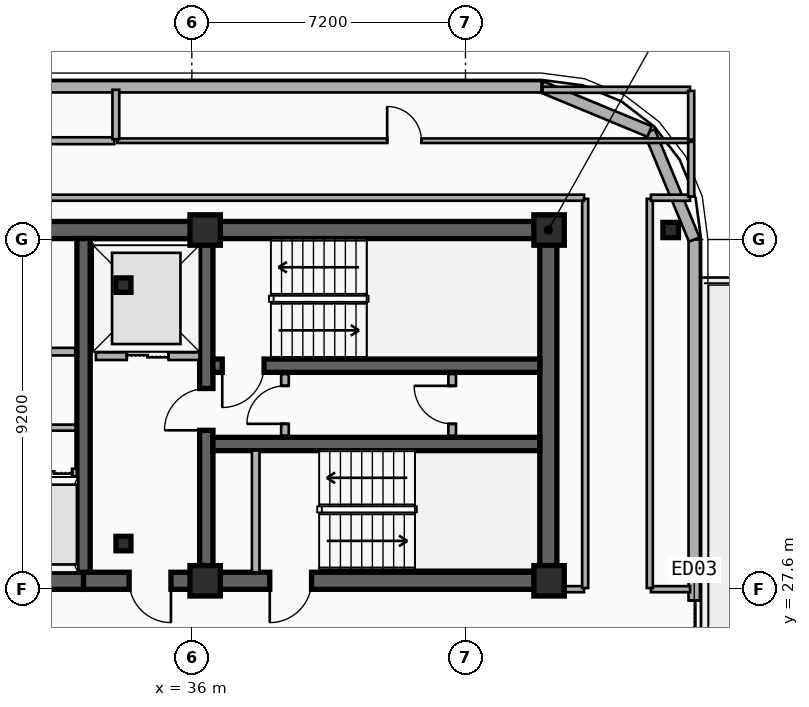
"""IFC4 building model, lengths in metres.
Left out: names, types, materials, properties, quantities, classifications, styles, units other than length and angle.
Written with IfcOpenShell. Run it as: python <this file> out.ifc"""

import sys

from ifc_helpers import new_model, si_unit, direction, frame, frame_2d, origin, origin_2d, place, context, subcontext, project, spatial, rectangle, i_section, extrude, element, fill, save


model = new_model("IFC4")
c1 = context("Model", 3, precision=1e-05, world=origin(), true_north=direction((0.0, 1.0)))
c2 = subcontext(c1, "Body", "Model", "MODEL_VIEW")
j1 = project(units=[si_unit("LENGTHUNIT", "METRE"), si_unit("PLANEANGLEUNIT", "RADIAN")], contexts=[c1])
p1 = place(None, origin())
s1 = spatial("IfcSite", under=j1, at=p1, CompositionType="ELEMENT")
p2 = place(p1, origin())
s2 = spatial("IfcBuilding", under=s1, at=p2, CompositionType="ELEMENT")
p3 = place(p2, frame((0.0, 0.0, 243.6)))
s3 = spatial("IfcBuildingStorey", under=s2, at=p3, CompositionType="ELEMENT", Elevation=243.6)
p4 = place(p3, frame((12.15, 37.05, 0.0), z_axis=(0.0, 0.0, 1.0), x_axis=(1.0, 0.0, 0.0)))
e1 = element("IfcWall", 1, at=p4, inside=s3, PredefinedType="SHEAR", context=c2, shape_type="SweptSolid", body=[
    extrude(rectangle(XDim=33.23, YDim=0.45, at=frame_2d((16.615, 0.0))), origin(), (0.0, 0.0, 1.0), 3.7),
])
p5 = place(p3, frame((33.15, 27.82, 0.0), z_axis=(0.0, 0.0, 1.0), x_axis=(-1.0, 0.0, 0.0)))
e2 = element("IfcWall", 2, at=p5, inside=s3, PredefinedType="SHEAR", context=c2, shape_type="SweptSolid", body=[
    extrude(rectangle(XDim=11.97, YDim=0.45, at=frame_2d((5.985, 0.0))), origin(), (0.0, 0.0, 1.0), 3.7),
])
p6 = place(p5, frame((6.1, 0.0, 0.0)))
e3 = element("IfcOpeningElement", 3, at=p6, cuts=e2, PredefinedType="OPENING", context=c2, shape_type="SweptSolid", body=[
    extrude(rectangle(XDim=1.6, YDim=2.2, at=frame_2d((0.8, 1.1))), frame((0.0, 0.235, 0.0), z_axis=(0.0, -1.0, 0.0), x_axis=(1.0, 0.0, 0.0)), (0.0, 0.0, 1.0), 0.47),
])
p7 = place(p3, frame((45.38, 27.82, 0.0), z_axis=(0.0, 0.0, 1.0), x_axis=(-1.0, 0.0, 0.0)))
e4 = element("IfcWall", 4, at=p7, inside=s3, PredefinedType="SHEAR", context=c2, shape_type="SweptSolid", body=[
    extrude(rectangle(XDim=12.23, YDim=0.45, at=frame_2d((6.115, 0.0))), origin(), (0.0, 0.0, 1.0), 3.7),
])
p8 = place(p7, frame((9.93, 0.0, 0.0)))
e5 = element("IfcOpeningElement", 5, at=p8, cuts=e4, PredefinedType="OPENING", context=c2, shape_type="SweptSolid", body=[
    extrude(rectangle(XDim=1.1, YDim=2.15, at=frame_2d((0.55, 1.075))), frame((0.0, 0.235, 0.0), z_axis=(0.0, -1.0, 0.0), x_axis=(1.0, 0.0, 0.0)), (0.0, 0.0, 1.0), 0.47),
])
p9 = place(p7, frame((6.23, 0.0, 0.0)))
e6 = element("IfcOpeningElement", 6, at=p9, cuts=e4, PredefinedType="OPENING", context=c2, shape_type="SweptSolid", body=[
    extrude(rectangle(XDim=1.1, YDim=2.15, at=frame_2d((0.55, 1.075))), frame((0.0, 0.235, 0.0), z_axis=(0.0, -1.0, 0.0), x_axis=(1.0, 0.0, 0.0)), (0.0, 0.0, 1.0), 0.47),
])
p10 = place(p3, frame((45.38, 28.045, 0.0), z_axis=(0.0, 0.0, 1.0), x_axis=(0.0, 1.0, 0.0)))
e7 = element("IfcWall", 7, at=p10, inside=s3, PredefinedType="SHEAR", context=c2, shape_type="SweptSolid", body=[
    extrude(rectangle(XDim=8.78, YDim=0.45, at=frame_2d((4.39, 0.0))), origin(), (0.0, 0.0, 1.0), 3.7),
])
p11 = place(p3, frame((33.15, 28.045, 0.0), z_axis=(0.0, 0.0, 1.0), x_axis=(0.0, 1.0, 0.0)))
e8 = element("IfcWall", 8, at=p11, inside=s3, PredefinedType="SHEAR", context=c2, shape_type="SweptSolid", body=[
    extrude(rectangle(XDim=8.78, YDim=0.35, at=frame_2d((4.39, 0.0))), origin(), (0.0, 0.0, 1.0), 3.7),
])
p12 = place(p3, frame((36.38, 28.045, 0.0), z_axis=(0.0, 0.0, 1.0), x_axis=(0.0, 1.0, 0.0)))
e9 = element("IfcWall", 9, at=p12, inside=s3, PredefinedType="SHEAR", context=c2, shape_type="SweptSolid", body=[
    extrude(rectangle(XDim=8.78, YDim=0.35, at=frame_2d((4.39, 0.0))), origin(), (0.0, 0.0, 1.0), 3.7),
])
p13 = place(p12, frame((3.735, 0.0, 0.0)))
e10 = element("IfcOpeningElement", 10, at=p13, cuts=e9, PredefinedType="OPENING", context=c2, shape_type="SweptSolid", body=[
    extrude(rectangle(XDim=1.1, YDim=2.15, at=frame_2d((0.55, 1.075))), frame((0.0, 0.185, 0.0), z_axis=(0.0, -1.0, 0.0), x_axis=(1.0, 0.0, 0.0)), (0.0, 0.0, 1.0), 0.37),
])
p14 = place(p3, frame((45.155, 33.48, 0.0), z_axis=(0.0, 0.0, 1.0), x_axis=(-1.0, 0.0, 0.0)))
e11 = element("IfcWall", 11, at=p14, inside=s3, PredefinedType="SHEAR", context=c2, shape_type="SweptSolid", body=[
    extrude(rectangle(XDim=8.6, YDim=0.35, at=frame_2d((4.3, 0.0))), origin(), (0.0, 0.0, 1.0), 3.7),
])
p15 = place(p14, frame((7.255, 0.0, 0.0)))
e12 = element("IfcOpeningElement", 12, at=p15, cuts=e11, PredefinedType="OPENING", context=c2, shape_type="SweptSolid", body=[
    extrude(rectangle(XDim=1.1, YDim=2.15, at=frame_2d((0.55, 1.075))), frame((0.0, 0.185, 0.0), z_axis=(0.0, -1.0, 0.0), x_axis=(1.0, 0.0, 0.0)), (0.0, 0.0, 1.0), 0.37),
])
p16 = place(p3, frame((36.555, 31.42, 0.0), z_axis=(0.0, 0.0, 1.0), x_axis=(1.0, 0.0, 0.0)))
e13 = element("IfcWall", 13, at=p16, inside=s3, PredefinedType="SHEAR", context=c2, shape_type="SweptSolid", body=[
    extrude(rectangle(XDim=8.6, YDim=0.35, at=frame_2d((4.3, 0.0))), origin(), (0.0, 0.0, 1.0), 3.7),
])
for number, where, z_axis, x_axis in (
    (14, (34.2, 28.8, 0.0), (0.0, 0.0, 1.0), (1.0, 0.0, 0.0)),
    (15, (34.2, 35.6, 0.0), (0.0, 0.0, 1.0), (1.0, 0.0, 0.0)),
):
    element("IfcColumn", number, at=place(p3, frame(where, z_axis=z_axis, x_axis=x_axis)), inside=s3, PredefinedType="COLUMN", context=c2, shape_type="SweptSolid", body=[
        extrude(i_section(OverallWidth=0.395, OverallDepth=0.38, WebThickness=0.019, FlangeThickness=0.03, FilletRadius=0.015, at=origin_2d()), origin(), (0.0, 0.0, 1.0), 3.7),
    ])
for number, where, z_axis, x_axis in (
    (16, (36.35, 27.82, 0.0), (0.0, 0.0, 1.0), (1.0, 0.0, 0.0)),
    (17, (36.35, 37.05, 0.0), (0.0, 0.0, 1.0), (1.0, 0.0, 0.0)),
    (18, (45.4, 27.82, 0.0), (0.0, 0.0, 1.0), (1.0, 0.0, 0.0)),
    (19, (45.4, 37.05, 0.0), (0.0, 0.0, 1.0), (1.0, 0.0, 0.0)),
):
    element("IfcColumn", number, at=place(p3, frame(where, z_axis=z_axis, x_axis=x_axis)), inside=s3, PredefinedType="COLUMN", context=c2, shape_type="SweptSolid", body=[
        extrude(rectangle(XDim=0.8, YDim=0.8, at=origin_2d()), origin(), (0.0, 0.0, 1.0), 3.7),
    ])
p17 = place(p3, frame((48.6, 37.05, 0.0), z_axis=(0.0, 0.0, 1.0), x_axis=(1.0, 0.0, 0.0)))
e20 = element("IfcColumn", 20, at=p17, inside=s3, PredefinedType="COLUMN", context=c2, shape_type="SweptSolid", body=[
    extrude(i_section(OverallWidth=0.408, OverallDepth=0.4, WebThickness=0.025, FlangeThickness=0.039, FilletRadius=0.015, at=origin_2d()), origin(), (0.0, 0.0, 1.0), 3.7),
])
p18 = place(p3, frame((49.22, 36.8, 0.0), z_axis=(0.0, 0.0, 1.0), x_axis=(0.0, -1.0, 0.0)))
e21 = element("IfcWall", 21, at=p18, inside=s3, PredefinedType="SOLIDWALL", context=c2, shape_type="SweptSolid", body=[
    extrude(rectangle(XDim=34.2, YDim=0.3, at=frame_2d((17.1, 0.0))), origin(), (0.0, 0.0, 1.0), 3.42),
])
p19 = place(p18, frame((9.5, 0.0, 0.0)))
e22 = element("IfcOpeningElement", 22, at=p19, cuts=e21, PredefinedType="OPENING", context=c2, shape_type="SweptSolid", body=[
    extrude(rectangle(XDim=1.6, YDim=2.2, at=frame_2d((0.8, 1.1))), frame((0.0, 0.16, 0.0), z_axis=(0.0, -1.0, 0.0), x_axis=(1.0, 0.0, 0.0)), (0.0, 0.0, 1.0), 0.32),
])
p20 = place(p18, frame((31.912, 0.0, 0.8)))
e23 = element("IfcOpeningElement", 23, at=p20, cuts=e21, PredefinedType="OPENING", context=c2, shape_type="SweptSolid", body=[
    extrude(rectangle(XDim=1.8, YDim=1.8, at=frame_2d((0.9, 0.9))), frame((0.0, 0.16, 0.0), z_axis=(0.0, -1.0, 0.0), x_axis=(1.0, 0.0, 0.0)), (0.0, 0.0, 1.0), 0.32),
])
p21 = place(p18, frame((27.668, 0.0, 0.75)))
e24 = element("IfcOpeningElement", 24, at=p21, cuts=e21, PredefinedType="OPENING", context=c2, shape_type="SweptSolid", body=[
    extrude(rectangle(XDim=2.1, YDim=2.1, at=frame_2d((1.05, 1.05))), frame((0.0, 0.16, 0.0), z_axis=(0.0, -1.0, 0.0), x_axis=(1.0, 0.0, 0.0)), (0.0, 0.0, 1.0), 0.32),
])
p22 = place(p18, frame((22.503, 0.0, 0.75)))
e25 = element("IfcOpeningElement", 25, at=p22, cuts=e21, PredefinedType="OPENING", context=c2, shape_type="SweptSolid", body=[
    extrude(rectangle(XDim=2.1, YDim=2.1, at=frame_2d((1.05, 1.05))), frame((0.0, 0.16, 0.0), z_axis=(0.0, -1.0, 0.0), x_axis=(1.0, 0.0, 0.0)), (0.0, 0.0, 1.0), 0.32),
])
p23 = place(p18, frame((17.623, 0.0, 0.75)))
e26 = element("IfcOpeningElement", 26, at=p23, cuts=e21, PredefinedType="OPENING", context=c2, shape_type="SweptSolid", body=[
    extrude(rectangle(XDim=2.1, YDim=2.1, at=frame_2d((1.05, 1.05))), frame((0.0, 0.16, 0.0), z_axis=(0.0, -1.0, 0.0), x_axis=(1.0, 0.0, 0.0)), (0.0, 0.0, 1.0), 0.32),
])
p24 = place(p18, frame((13.832, 0.0, 0.75)))
e27 = element("IfcOpeningElement", 27, at=p24, cuts=e21, PredefinedType="OPENING", context=c2, shape_type="SweptSolid", body=[
    extrude(rectangle(XDim=2.1, YDim=2.1, at=frame_2d((1.05, 1.05))), frame((0.0, 0.16, 0.0), z_axis=(0.0, -1.0, 0.0), x_axis=(1.0, 0.0, 0.0)), (0.0, 0.0, 1.0), 0.32),
])
for number, where, z_axis, x_axis in (
    (28, (48.042, 39.643, 0.0), (0.0, 0.0, 1.0), (0.383, -0.924, 0.0)),
    (29, (45.2, 40.82, 0.0), (0.0, 0.0, 1.0), (0.924, -0.383, 0.0)),
):
    element("IfcWall", number, at=place(p3, frame(where, z_axis=z_axis, x_axis=x_axis)), inside=s3, PredefinedType="SOLIDWALL", context=c2, shape_type="SweptSolid", body=[
        extrude(rectangle(XDim=3.077, YDim=0.3, at=frame_2d((1.538, 0.0))), origin(), (0.0, 0.0, 1.0), 3.42),
    ])
p25 = place(p3, frame((12.4, 40.82, 0.0), z_axis=(0.0, 0.0, 1.0), x_axis=(1.0, 0.0, 0.0)))
e30 = element("IfcWall", 30, at=p25, inside=s3, PredefinedType="SOLIDWALL", context=c2, shape_type="SweptSolid", body=[
    extrude(rectangle(XDim=32.8, YDim=0.3, at=frame_2d((16.4, 0.0))), origin(), (0.0, 0.0, 1.0), 3.42),
])
p26 = place(p25, frame((3.38, 0.0, 0.75)))
e31 = element("IfcOpeningElement", 31, at=p26, cuts=e30, PredefinedType="OPENING", context=c2, shape_type="SweptSolid", body=[
    extrude(rectangle(XDim=2.1, YDim=2.1, at=frame_2d((1.05, 1.05))), frame((0.0, 0.16, 0.0), z_axis=(0.0, -1.0, 0.0), x_axis=(1.0, 0.0, 0.0)), (0.0, 0.0, 1.0), 0.32),
])
p27 = place(p25, frame((8.54, 0.0, 0.75)))
e32 = element("IfcOpeningElement", 32, at=p27, cuts=e30, PredefinedType="OPENING", context=c2, shape_type="SweptSolid", body=[
    extrude(rectangle(XDim=2.1, YDim=2.1, at=frame_2d((1.05, 1.05))), frame((0.0, 0.16, 0.0), z_axis=(0.0, -1.0, 0.0), x_axis=(1.0, 0.0, 0.0)), (0.0, 0.0, 1.0), 0.32),
])
p28 = place(p3, frame((33.475, 33.73, 0.0), z_axis=(0.0, 0.0, 1.0), x_axis=(1.0, 0.0, 0.0)))
e33 = element("IfcWall", 33, at=p28, inside=s3, PredefinedType="PARTITIONING", context=c2, shape_type="SweptSolid", body=[
    extrude(rectangle(XDim=2.725, YDim=0.2, at=frame_2d((1.362, 0.0))), origin(), (0.0, 0.0, 1.0), 2.49),
])
p29 = place(p28, frame((0.812, 0.0, 0.0)))
e34 = element("IfcOpeningElement", 34, at=p29, cuts=e33, PredefinedType="OPENING", context=c2, shape_type="SweptSolid", body=[
    extrude(rectangle(XDim=1.1, YDim=2.15, at=frame_2d((0.55, 1.075))), frame((0.0, 0.11, 0.0), z_axis=(0.0, -1.0, 0.0), x_axis=(1.0, 0.0, 0.0)), (0.0, 0.0, 1.0), 0.22),
])
p30 = place(p3, frame((31.775, 30.67, 0.0), z_axis=(0.0, 0.0, 1.0), x_axis=(1.0, 0.0, 0.0)))
e35 = element("IfcWall", 35, at=p30, inside=s3, PredefinedType="PARTITIONING", context=c2, shape_type="SweptSolid", body=[
    extrude(rectangle(XDim=1.2, YDim=0.2, at=frame_2d((0.6, 0.0))), origin(), (0.0, 0.0, 1.0), 2.8),
])
p31 = place(p30, frame((0.125, 0.0, 0.0)))
e36 = element("IfcOpeningElement", 36, at=p31, cuts=e35, PredefinedType="OPENING", context=c2, shape_type="SweptSolid", body=[
    extrude(rectangle(XDim=0.95, YDim=2.15, at=frame_2d((0.475, 1.075))), frame((0.0, 0.11, 0.0), z_axis=(0.0, -1.0, 0.0), x_axis=(1.0, 0.0, 0.0)), (0.0, 0.0, 1.0), 0.22),
])
p32 = place(p3, frame((37.68, 28.045, 0.0), z_axis=(0.0, 0.0, 1.0), x_axis=(0.0, 1.0, 0.0)))
e37 = element("IfcWall", 37, at=p32, inside=s3, PredefinedType="PARTITIONING", context=c2, shape_type="SweptSolid", body=[
    extrude(rectangle(XDim=3.205, YDim=0.2, at=frame_2d((1.603, 0.0))), origin(), (0.0, 0.0, 1.0), 2.8),
])
p33 = place(p3, frame((38.45, 31.64, 0.0), z_axis=(0.0, 0.0, 1.0), x_axis=(0.0, 1.0, 0.0)))
e38 = element("IfcWall", 38, at=p33, inside=s3, PredefinedType="PARTITIONING", context=c2, shape_type="SweptSolid", body=[
    extrude(rectangle(XDim=1.62, YDim=0.2, at=frame_2d((0.81, 0.0))), origin(), (0.0, 0.0, 1.0), 3.42),
])
p34 = place(p33, frame((0.31, 0.0, 0.0)))
e39 = element("IfcOpeningElement", 39, at=p34, cuts=e38, PredefinedType="OPENING", context=c2, shape_type="SweptSolid", body=[
    extrude(rectangle(XDim=1.0, YDim=2.15, at=frame_2d((0.5, 1.075))), frame((0.0, 0.11, 0.0), z_axis=(0.0, -1.0, 0.0), x_axis=(1.0, 0.0, 0.0)), (0.0, 0.0, 1.0), 0.22),
])
p35 = place(p3, frame((42.85, 31.64, 0.0), z_axis=(0.0, 0.0, 1.0), x_axis=(0.0, 1.0, 0.0)))
e40 = element("IfcWall", 40, at=p35, inside=s3, PredefinedType="PARTITIONING", context=c2, shape_type="SweptSolid", body=[
    extrude(rectangle(XDim=1.62, YDim=0.2, at=frame_2d((0.81, 0.0))), origin(), (0.0, 0.0, 1.0), 3.42),
])
p36 = place(p35, frame((0.31, 0.0, 0.0)))
e41 = element("IfcOpeningElement", 41, at=p36, cuts=e40, PredefinedType="OPENING", context=c2, shape_type="SweptSolid", body=[
    extrude(rectangle(XDim=1.0, YDim=2.15, at=frame_2d((0.5, 1.075))), frame((0.0, 0.11, 0.0), z_axis=(0.0, -1.0, 0.0), x_axis=(1.0, 0.0, 0.0)), (0.0, 0.0, 1.0), 0.22),
])
p37 = place(p3, frame((29.09, 33.85, 0.0), z_axis=(0.0, 0.0, 1.0), x_axis=(1.0, 0.0, 0.0)))
e42 = element("IfcWall", 42, at=p37, inside=s3, PredefinedType="PARTITIONING", context=c2, shape_type="SweptSolid", body=[
    extrude(rectangle(XDim=3.84, YDim=0.2, at=frame_2d((1.92, 0.0))), origin(), (0.0, 0.0, 1.0), 2.49),
])
p38 = place(p37, frame((1.32, 0.0, 0.0)))
e43 = element("IfcOpeningElement", 43, at=p38, cuts=e42, PredefinedType="OPENING", context=c2, shape_type="SweptSolid", body=[
    extrude(rectangle(XDim=1.2, YDim=2.15, at=frame_2d((0.6, 1.075))), frame((0.0, 0.11, 0.0), z_axis=(0.0, -1.0, 0.0), x_axis=(1.0, 0.0, 0.0)), (0.0, 0.0, 1.0), 0.22),
])
p39 = place(p3, frame((26.44, 39.4, 0.0), z_axis=(0.0, 0.0, 1.0), x_axis=(1.0, 0.0, 0.0)))
e44 = element("IfcWall", 44, at=p39, inside=s3, PredefinedType="PLUMBINGWALL", context=c2, shape_type="SweptSolid", body=[
    extrude(rectangle(XDim=7.52, YDim=0.18, at=frame_2d((3.76, 0.0))), origin(), (0.0, 0.0, 1.0), 3.42),
])
p40 = place(p39, frame((3.335, 0.0, 0.0)))
e45 = element("IfcOpeningElement", 45, at=p40, cuts=e44, PredefinedType="OPENING", context=c2, shape_type="SweptSolid", body=[
    extrude(rectangle(XDim=0.85, YDim=2.1, at=frame_2d((0.425, 1.05))), frame((0.0, 0.1, 0.0), z_axis=(0.0, -1.0, 0.0), x_axis=(1.0, 0.0, 0.0)), (0.0, 0.0, 1.0), 0.2),
])
p41 = place(p3, frame((34.04, 39.4, 0.0), z_axis=(0.0, 0.0, 1.0), x_axis=(1.0, 0.0, 0.0)))
e46 = element("IfcWall", 46, at=p41, inside=s3, PredefinedType="PARTITIONING", context=c2, shape_type="SweptSolid", body=[
    extrude(rectangle(XDim=15.1, YDim=0.12, at=frame_2d((7.55, 0.0))), origin(), (0.0, 0.0, 1.0), 3.42),
])
p42 = place(p41, frame((7.1, 0.0, 0.0)))
e47 = element("IfcOpeningElement", 47, at=p42, cuts=e46, PredefinedType="OPENING", context=c2, shape_type="SweptSolid", body=[
    extrude(rectangle(XDim=0.9, YDim=2.1, at=frame_2d((0.45, 1.05))), frame((0.0, 0.07, 0.0), z_axis=(0.0, -1.0, 0.0), x_axis=(1.0, 0.0, 0.0)), (0.0, 0.0, 1.0), 0.14),
])
p43 = place(p3, frame((34.0, 39.44, 0.0), z_axis=(0.0, 0.0, 1.0), x_axis=(0.0, 1.0, 0.0)))
e48 = element("IfcWall", 48, at=p43, inside=s3, PredefinedType="PLUMBINGWALL", context=c2, shape_type="SweptSolid", body=[
    extrude(rectangle(XDim=1.3, YDim=0.18, at=frame_2d((0.65, 0.0))), origin(), (0.0, 0.0, 1.0), 3.42),
])
p44 = place(p3, frame((27.63, 31.85, 0.0), z_axis=(0.0, 0.0, 1.0), x_axis=(1.0, 0.0, 0.0)))
e49 = element("IfcWall", 49, at=p44, inside=s3, PredefinedType="PARTITIONING", context=c2, shape_type="SweptSolid", body=[
    extrude(rectangle(XDim=5.31, YDim=0.16, at=frame_2d((2.655, 0.0))), origin(), (0.0, 0.0, 1.0), 2.49),
])
p45 = place(p3, frame((45.41, 27.6, 0.0), z_axis=(0.0, 0.0, 1.0), x_axis=(1.0, 0.0, 0.0)))
e50 = element("IfcWall", 50, at=p45, inside=s3, PredefinedType="PARTITIONING", context=c2, shape_type="SweptSolid", body=[
    extrude(rectangle(XDim=0.91, YDim=0.16, at=frame_2d((0.455, 0.0))), origin(), (0.0, 0.0, 1.0), 2.49),
])
p46 = place(p3, frame((48.08, 27.6, 0.0), z_axis=(0.0, 0.0, 1.0), x_axis=(1.0, 0.0, 0.0)))
e51 = element("IfcWall", 51, at=p46, inside=s3, PredefinedType="PARTITIONING", context=c2, shape_type="SweptSolid", body=[
    extrude(rectangle(XDim=1.03, YDim=0.16, at=frame_2d((0.515, 0.0))), origin(), (0.0, 0.0, 1.0), 3.42),
])
for number, where, z_axis, x_axis in (
    (52, (46.35, 27.63, 0.0), (0.0, 0.0, 1.0), (0.0, 1.0, 0.0)),
    (53, (48.05, 27.63, 0.0), (0.0, 0.0, 1.0), (0.0, 1.0, 0.0)),
):
    element("IfcWall", number, at=place(p3, frame(where, z_axis=z_axis, x_axis=x_axis)), inside=s3, PredefinedType="PARTITIONING", context=c2, shape_type="SweptSolid", body=[
        extrude(rectangle(XDim=10.24, YDim=0.16, at=frame_2d((5.12, 0.0))), origin(), (0.0, 0.0, 1.0), 2.9),
    ])
p47 = place(p3, frame((11.28, 37.9, 0.0), z_axis=(0.0, 0.0, 1.0), x_axis=(1.0, 0.0, 0.0)))
e54 = element("IfcWall", 54, at=p47, inside=s3, PredefinedType="PARTITIONING", context=c2, shape_type="SweptSolid", body=[
    extrude(rectangle(XDim=35.04, YDim=0.16, at=frame_2d((17.52, 0.0))), origin(), (0.0, 0.0, 1.0), 3.42),
])
p48 = place(p3, frame((48.08, 37.9, 0.0), z_axis=(0.0, 0.0, 1.0), x_axis=(1.0, 0.0, 0.0)))
e55 = element("IfcWall", 55, at=p48, inside=s3, PredefinedType="PARTITIONING", context=c2, shape_type="SweptSolid", body=[
    extrude(rectangle(XDim=1.03, YDim=0.16, at=frame_2d((0.515, 0.0))), origin(), (0.0, 0.0, 1.0), 3.42),
])
p49 = place(p3, frame((49.14, 37.93, 0.0), z_axis=(0.0, 0.0, 1.0), x_axis=(0.0, 1.0, 0.0)))
e56 = element("IfcWall", 56, at=p49, inside=s3, PredefinedType="PARTITIONING", context=c2, shape_type="SweptSolid", body=[
    extrude(rectangle(XDim=1.44, YDim=0.16, at=frame_2d((0.72, 0.0))), origin(), (0.0, 0.0, 1.0), 3.42),
])
p50 = place(p3, frame((45.23, 40.74, 0.0), z_axis=(0.0, 0.0, 1.0), x_axis=(1.0, 0.0, 0.0)))
e57 = element("IfcWall", 57, at=p50, inside=s3, PredefinedType="PARTITIONING", context=c2, shape_type="SweptSolid", body=[
    extrude(rectangle(XDim=3.88, YDim=0.16, at=frame_2d((1.94, 0.0))), origin(), (0.0, 0.0, 1.0), 3.42),
])
p51 = place(p3, frame((49.14, 39.43, 0.0), z_axis=(0.0, 0.0, 1.0), x_axis=(0.0, 1.0, 0.0)))
e58 = element("IfcWall", 58, at=p51, inside=s3, PredefinedType="PARTITIONING", context=c2, shape_type="SweptSolid", body=[
    extrude(rectangle(XDim=1.28, YDim=0.16, at=frame_2d((0.64, 0.0))), origin(), (0.0, 0.0, 1.0), 3.42),
])
p52 = place(p19, origin())
e59 = element("IfcDoor", 59, at=p52, inside=s3, OperationType="DOUBLE_DOOR_SLIDING", PredefinedType="DOOR", context=c2, shape_type="SweptSolid", body=[
    extrude(rectangle(XDim=1.6, YDim=2.2, at=frame_2d((0.8, 1.1))), frame((0.0, 0.025, 0.0), z_axis=(0.0, -1.0, 0.0), x_axis=(1.0, 0.0, 0.0)), (0.0, 0.0, 1.0), 0.05),
])
fill(e22, e59)
p53 = place(p29, origin())
e60 = element("IfcDoor", 60, at=p53, inside=s3, OperationType="DOUBLE_DOOR_SLIDING", PredefinedType="DOOR", context=c2, shape_type="SweptSolid", body=[
    extrude(rectangle(XDim=1.1, YDim=2.15, at=frame_2d((0.55, 1.075))), frame((0.0, 0.025, 0.0), z_axis=(0.0, -1.0, 0.0), x_axis=(1.0, 0.0, 0.0)), (0.0, 0.0, 1.0), 0.05),
])
fill(e34, e60)
p54 = place(p31, origin())
e61 = element("IfcDoor", 61, at=p54, inside=s3, OperationType="DOUBLE_DOOR_SLIDING", PredefinedType="DOOR", context=c2, shape_type="SweptSolid", body=[
    extrude(rectangle(XDim=0.95, YDim=2.15, at=frame_2d((0.475, 1.075))), frame((0.0, 0.025, 0.0), z_axis=(0.0, -1.0, 0.0), x_axis=(1.0, 0.0, 0.0)), (0.0, 0.0, 1.0), 0.05),
])
fill(e36, e61)
p55 = place(p15, origin())
e62 = element("IfcDoor", 62, at=p55, inside=s3, OperationType="SINGLE_SWING_RIGHT", PredefinedType="DOOR", context=c2, shape_type="SweptSolid", body=[
    extrude(rectangle(XDim=1.1, YDim=2.15, at=frame_2d((0.55, 1.075))), frame((0.0, 0.025, 0.0), z_axis=(0.0, -1.0, 0.0), x_axis=(1.0, 0.0, 0.0)), (0.0, 0.0, 1.0), 0.05),
])
fill(e12, e62)
p56 = place(p13, origin())
e63 = element("IfcDoor", 63, at=p56, inside=s3, OperationType="SINGLE_SWING_LEFT", PredefinedType="DOOR", context=c2, shape_type="SweptSolid", body=[
    extrude(rectangle(XDim=1.1, YDim=2.15, at=frame_2d((0.55, 1.075))), frame((0.0, 0.025, 0.0), z_axis=(0.0, -1.0, 0.0), x_axis=(1.0, 0.0, 0.0)), (0.0, 0.0, 1.0), 0.05),
])
fill(e10, e63)
p57 = place(p8, origin())
e64 = element("IfcDoor", 64, at=p57, inside=s3, OperationType="SINGLE_SWING_LEFT", PredefinedType="DOOR", context=c2, shape_type="SweptSolid", body=[
    extrude(rectangle(XDim=1.1, YDim=2.15, at=frame_2d((0.55, 1.075))), frame((0.0, 0.025, 0.0), z_axis=(0.0, -1.0, 0.0), x_axis=(1.0, 0.0, 0.0)), (0.0, 0.0, 1.0), 0.05),
])
fill(e5, e64)
p58 = place(p9, origin())
e65 = element("IfcDoor", 65, at=p58, inside=s3, OperationType="SINGLE_SWING_RIGHT", PredefinedType="DOOR", context=c2, shape_type="SweptSolid", body=[
    extrude(rectangle(XDim=1.1, YDim=2.15, at=frame_2d((0.55, 1.075))), frame((0.0, 0.025, 0.0), z_axis=(0.0, -1.0, 0.0), x_axis=(1.0, 0.0, 0.0)), (0.0, 0.0, 1.0), 0.05),
])
fill(e6, e65)
p59 = place(p34, origin())
e66 = element("IfcDoor", 66, at=p59, inside=s3, OperationType="SINGLE_SWING_LEFT", PredefinedType="DOOR", context=c2, shape_type="SweptSolid", body=[
    extrude(rectangle(XDim=1.0, YDim=2.15, at=frame_2d((0.5, 1.075))), frame((0.0, 0.025, 0.0), z_axis=(0.0, -1.0, 0.0), x_axis=(1.0, 0.0, 0.0)), (0.0, 0.0, 1.0), 0.05),
])
fill(e39, e66)
p60 = place(p36, origin())
e67 = element("IfcDoor", 67, at=p60, inside=s3, OperationType="SINGLE_SWING_RIGHT", PredefinedType="DOOR", context=c2, shape_type="SweptSolid", body=[
    extrude(rectangle(XDim=1.0, YDim=2.15, at=frame_2d((0.5, 1.075))), frame((0.0, 0.025, 0.0), z_axis=(0.0, -1.0, 0.0), x_axis=(1.0, 0.0, 0.0)), (0.0, 0.0, 1.0), 0.05),
])
fill(e41, e67)
p61 = place(p42, origin())
e68 = element("IfcDoor", 68, at=p61, inside=s3, OperationType="SINGLE_SWING_LEFT", PredefinedType="DOOR", context=c2, shape_type="SweptSolid", body=[
    extrude(rectangle(XDim=0.9, YDim=2.1, at=frame_2d((0.45, 1.05))), frame((0.0, 0.025, 0.0), z_axis=(0.0, -1.0, 0.0), x_axis=(1.0, 0.0, 0.0)), (0.0, 0.0, 1.0), 0.05),
])
fill(e47, e68)
save(model, sys.argv[1])
